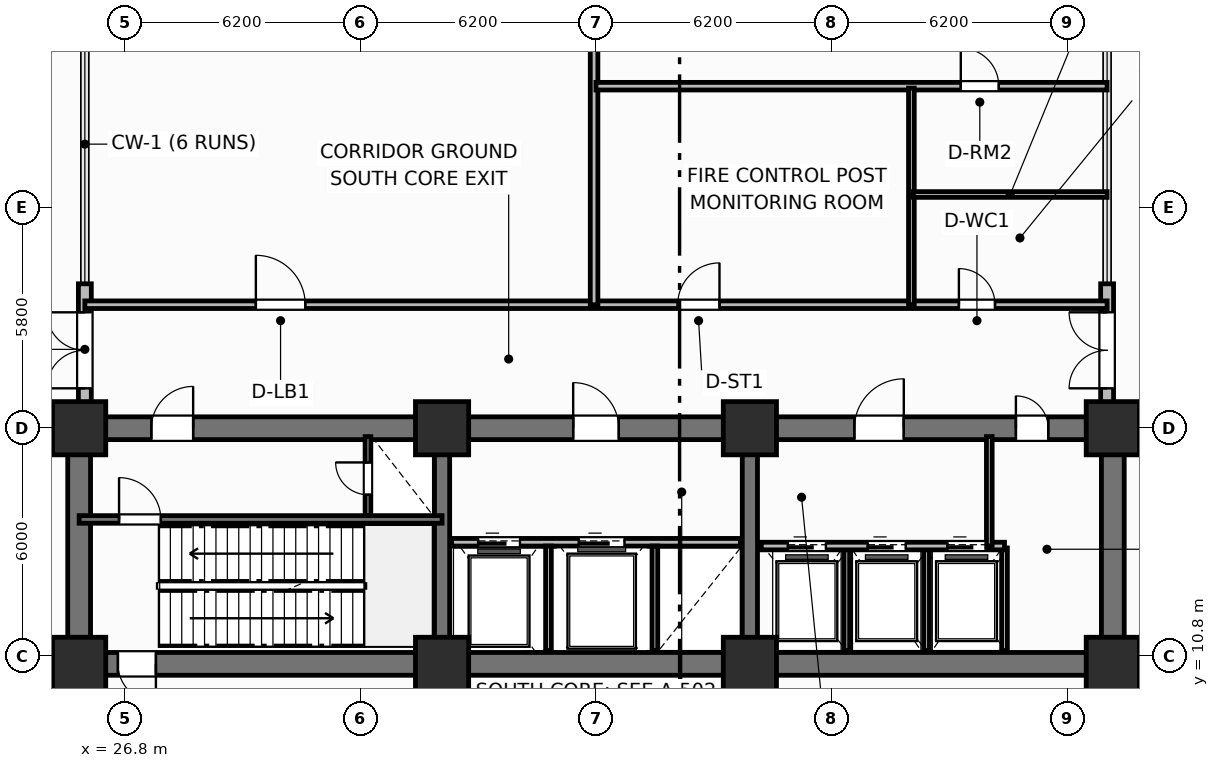
"""IFC4 building model, lengths in metres.
Left out: names, types, materials, properties, quantities, classifications, styles, units other than length and angle.
Written with IfcOpenShell. Run it as: python <this file> out.ifc"""

import sys

from ifc_helpers import new_model, si_unit, direction, frame, frame_2d, origin, origin_2d, place, context, subcontext, project, spatial, rectangle, extrude, element, fill, save


model = new_model("IFC4")
c1 = context("Model", 3, precision=1e-05, world=origin(), true_north=direction((0.0, 1.0)))
c2 = subcontext(c1, "Body", "Model", "MODEL_VIEW")
j1 = project(units=[si_unit("LENGTHUNIT", "METRE"), si_unit("PLANEANGLEUNIT", "RADIAN")], contexts=[c1])
p1 = place(None, origin())
s1 = spatial("IfcSite", under=j1, at=p1, CompositionType="ELEMENT")
p2 = place(p1, origin())
s2 = spatial("IfcBuilding", under=s1, at=p2, CompositionType="ELEMENT")
p3 = place(p2, origin())
s3 = spatial("IfcBuildingStorey", under=s2, at=p3, CompositionType="ELEMENT", Elevation=0.0)
p4 = place(p3, frame((52.8, 10.6, 0.0), z_axis=(0.0, 0.0, 1.0), x_axis=(-1.0, 0.0, 0.0)))
e1 = element("IfcWall", 1, at=p4, inside=s3, PredefinedType="SHEAR", context=c2, shape_type="SweptSolid", body=[
    extrude(rectangle(XDim=27.2, YDim=0.6, at=frame_2d((13.6, 0.0))), origin(), (0.0, 0.0, 1.0), 6.6),
])
p5 = place(p4, frame((25.18, 0.0, 0.0)))
e2 = element("IfcOpeningElement", 2, at=p5, cuts=e1, PredefinedType="OPENING", context=c2, shape_type="SweptSolid", body=[
    extrude(rectangle(XDim=1.0, YDim=2.15, at=frame_2d((0.5, 1.075))), frame((0.0, 0.31, 0.0), z_axis=(0.0, -1.0, 0.0), x_axis=(1.0, 0.0, 0.0)), (0.0, 0.0, 1.0), 0.62),
])
for number, where, z_axis, x_axis in (
    (3, (25.6, 10.9, 0.0), (0.0, 0.0, 1.0), (0.0, 1.0, 0.0)),
    (4, (52.8, 10.9, 0.0), (0.0, 0.0, 1.0), (0.0, 1.0, 0.0)),
):
    element("IfcWall", number, at=place(p3, frame(where, z_axis=z_axis, x_axis=x_axis)), inside=s3, PredefinedType="SHEAR", context=c2, shape_type="SweptSolid", body=[
        extrude(rectangle(XDim=5.6, YDim=0.6, at=frame_2d((2.8, 0.0))), origin(), (0.0, 0.0, 1.0), 6.6),
    ])
p6 = place(p3, frame((25.6, 16.8, 0.0), z_axis=(0.0, 0.0, 1.0), x_axis=(1.0, 0.0, 0.0)))
e5 = element("IfcWall", 5, at=p6, inside=s3, PredefinedType="SHEAR", context=c2, shape_type="SweptSolid", body=[
    extrude(rectangle(XDim=27.2, YDim=0.6, at=frame_2d((13.6, 0.0))), origin(), (0.0, 0.0, 1.0), 6.6),
])
p7 = place(p6, frame((1.9, 0.0, 0.0)))
e6 = element("IfcOpeningElement", 6, at=p7, cuts=e5, PredefinedType="OPENING", context=c2, shape_type="SweptSolid", body=[
    extrude(rectangle(XDim=1.1, YDim=2.15, at=frame_2d((0.55, 1.075))), frame((0.0, 0.31, 0.0), z_axis=(0.0, -1.0, 0.0), x_axis=(1.0, 0.0, 0.0)), (0.0, 0.0, 1.0), 0.62),
])
p8 = place(p6, frame((13.0, 0.0, 0.0)))
e7 = element("IfcOpeningElement", 7, at=p8, cuts=e5, PredefinedType="OPENING", context=c2, shape_type="SweptSolid", body=[
    extrude(rectangle(XDim=1.2, YDim=2.15, at=frame_2d((0.6, 1.075))), frame((0.0, 0.31, 0.0), z_axis=(0.0, -1.0, 0.0), x_axis=(1.0, 0.0, 0.0)), (0.0, 0.0, 1.0), 0.62),
])
p9 = place(p6, frame((20.4, 0.0, 0.0)))
e8 = element("IfcOpeningElement", 8, at=p9, cuts=e5, PredefinedType="OPENING", context=c2, shape_type="SweptSolid", body=[
    extrude(rectangle(XDim=1.3, YDim=2.2, at=frame_2d((0.65, 1.1))), frame((0.0, 0.31, 0.0), z_axis=(0.0, -1.0, 0.0), x_axis=(1.0, 0.0, 0.0)), (0.0, 0.0, 1.0), 0.62),
])
p10 = place(p6, frame((24.65, 0.0, 0.0)))
e9 = element("IfcOpeningElement", 9, at=p10, cuts=e5, PredefinedType="OPENING", context=c2, shape_type="SweptSolid", body=[
    extrude(rectangle(XDim=0.85, YDim=2.1, at=frame_2d((0.425, 1.05))), frame((0.0, 0.31, 0.0), z_axis=(0.0, -1.0, 0.0), x_axis=(1.0, 0.0, 0.0)), (0.0, 0.0, 1.0), 0.62),
])
for number, where, z_axis, x_axis in (
    (10, (35.15, 10.9, 0.0), (0.0, 0.0, 1.0), (0.0, 1.0, 0.0)),
    (11, (43.25, 10.9, 0.0), (0.0, 0.0, 1.0), (0.0, 1.0, 0.0)),
):
    element("IfcWall", number, at=place(p3, frame(where, z_axis=z_axis, x_axis=x_axis)), inside=s3, PredefinedType="SHEAR", context=c2, shape_type="SweptSolid", body=[
        extrude(rectangle(XDim=5.6, YDim=0.4, at=frame_2d((2.8, 0.0))), origin(), (0.0, 0.0, 1.0), 6.6),
    ])
for number, where, z_axis, x_axis in (
    (12, (25.6, 10.6, 0.0), (0.0, 0.0, 1.0), (1.0, 0.0, 0.0)),
    (13, (25.6, 16.8, 0.0), (0.0, 0.0, 1.0), (1.0, 0.0, 0.0)),
    (14, (35.15, 10.6, 0.0), (0.0, 0.0, 1.0), (1.0, 0.0, 0.0)),
    (15, (35.15, 16.8, 0.0), (0.0, 0.0, 1.0), (1.0, 0.0, 0.0)),
    (16, (43.25, 10.6, 0.0), (0.0, 0.0, 1.0), (1.0, 0.0, 0.0)),
    (17, (43.25, 16.8, 0.0), (0.0, 0.0, 1.0), (1.0, 0.0, 0.0)),
    (18, (52.8, 10.6, 0.0), (0.0, 0.0, 1.0), (1.0, 0.0, 0.0)),
    (19, (52.8, 16.8, 0.0), (0.0, 0.0, 1.0), (1.0, 0.0, 0.0)),
):
    element("IfcColumn", number, at=place(p3, frame(where, z_axis=z_axis, x_axis=x_axis)), inside=s3, PredefinedType="COLUMN", context=c2, shape_type="SweptSolid", body=[
        extrude(rectangle(XDim=1.4, YDim=1.4, at=origin_2d()), origin(), (0.0, 0.0, 1.0), 6.6),
    ])
p11 = place(p3, frame((25.75, 17.15, 0.0), z_axis=(0.0, 0.0, 1.0), x_axis=(0.0, 1.0, 0.0)))
e20 = element("IfcWall", 20, at=p11, inside=s3, PredefinedType="SOLIDWALL", context=c2, shape_type="SweptSolid", body=[
    extrude(rectangle(XDim=3.45, YDim=0.34, at=frame_2d((1.725, 0.0))), origin(), (0.0, 0.0, 1.0), 5.58),
])
p12 = place(p11, frame((0.7, 0.0, 0.0)))
e21 = element("IfcOpeningElement", 21, at=p12, cuts=e20, PredefinedType="OPENING", context=c2, shape_type="SweptSolid", body=[
    extrude(rectangle(XDim=2.0, YDim=2.45, at=frame_2d((1.0, 1.225))), frame((0.0, 0.18, 0.0), z_axis=(0.0, -1.0, 0.0), x_axis=(1.0, 0.0, 0.0)), (0.0, 0.0, 1.0), 0.36),
])
p13 = place(p3, frame((52.65, 17.15, 0.0), z_axis=(0.0, 0.0, 1.0), x_axis=(0.0, 1.0, 0.0)))
e22 = element("IfcWall", 22, at=p13, inside=s3, PredefinedType="SOLIDWALL", context=c2, shape_type="SweptSolid", body=[
    extrude(rectangle(XDim=3.45, YDim=0.34, at=frame_2d((1.725, 0.0))), origin(), (0.0, 0.0, 1.0), 5.58),
])
p14 = place(p13, frame((0.7, 0.0, 0.0)))
e23 = element("IfcOpeningElement", 23, at=p14, cuts=e22, PredefinedType="OPENING", context=c2, shape_type="SweptSolid", body=[
    extrude(rectangle(XDim=2.0, YDim=2.45, at=frame_2d((1.0, 1.225))), frame((0.0, 0.18, 0.0), z_axis=(0.0, -1.0, 0.0), x_axis=(1.0, 0.0, 0.0)), (0.0, 0.0, 1.0), 0.36),
])
p15 = place(p3, frame((25.6, 14.4, 0.0), z_axis=(0.0, 0.0, 1.0), x_axis=(1.0, 0.0, 0.0)))
e24 = element("IfcWall", 24, at=p15, inside=s3, PredefinedType="SHEAR", context=c2, shape_type="SweptSolid", body=[
    extrude(rectangle(XDim=9.55, YDim=0.2, at=frame_2d((4.775, 0.0))), origin(), (0.0, 0.0, 1.0), 6.6),
])
p16 = place(p15, frame((1.05, 0.0, 0.0)))
e25 = element("IfcOpeningElement", 25, at=p16, cuts=e24, PredefinedType="OPENING", context=c2, shape_type="SweptSolid", body=[
    extrude(rectangle(XDim=1.1, YDim=2.15, at=frame_2d((0.55, 1.075))), frame((0.0, 0.11, 0.0), z_axis=(0.0, -1.0, 0.0), x_axis=(1.0, 0.0, 0.0)), (0.0, 0.0, 1.0), 0.22),
])
p17 = place(p3, frame((33.2, 14.5, 0.0), z_axis=(0.0, 0.0, 1.0), x_axis=(0.0, 1.0, 0.0)))
e26 = element("IfcWall", 26, at=p17, inside=s3, PredefinedType="PARTITIONING", context=c2, shape_type="SweptSolid", body=[
    extrude(rectangle(XDim=2.08, YDim=0.15, at=frame_2d((1.04, 0.0))), origin(), (0.0, 0.0, 1.0), 5.52),
])
p18 = place(p17, frame((0.55, 0.0, 0.0)))
e27 = element("IfcOpeningElement", 27, at=p18, cuts=e26, PredefinedType="OPENING", context=c2, shape_type="SweptSolid", body=[
    extrude(rectangle(XDim=0.85, YDim=2.05, at=frame_2d((0.425, 1.025))), frame((0.0, 0.085, 0.0), z_axis=(0.0, -1.0, 0.0), x_axis=(1.0, 0.0, 0.0)), (0.0, 0.0, 1.0), 0.17),
])
p19 = place(p3, frame((35.4, 13.8, 0.0), z_axis=(0.0, 0.0, 1.0), x_axis=(1.0, 0.0, 0.0)))
e28 = element("IfcWall", 28, at=p19, inside=s3, PredefinedType="PARTITIONING", context=c2, shape_type="SweptSolid", body=[
    extrude(rectangle(XDim=7.6, YDim=0.2, at=frame_2d((3.8, 0.0))), origin(), (0.0, 0.0, 1.0), 5.18),
])
p20 = place(p19, frame((0.7, 0.0, 0.0)))
e29 = element("IfcOpeningElement", 29, at=p20, cuts=e28, PredefinedType="OPENING", context=c2, shape_type="SweptSolid", body=[
    extrude(rectangle(XDim=1.1, YDim=2.15, at=frame_2d((0.55, 1.075))), frame((0.0, 0.11, 0.0), z_axis=(0.0, -1.0, 0.0), x_axis=(1.0, 0.0, 0.0)), (0.0, 0.0, 1.0), 0.22),
])
p21 = place(p19, frame((3.35, 0.0, 0.0)))
e30 = element("IfcOpeningElement", 30, at=p21, cuts=e28, PredefinedType="OPENING", context=c2, shape_type="SweptSolid", body=[
    extrude(rectangle(XDim=1.2, YDim=2.15, at=frame_2d((0.6, 1.075))), frame((0.0, 0.11, 0.0), z_axis=(0.0, -1.0, 0.0), x_axis=(1.0, 0.0, 0.0)), (0.0, 0.0, 1.0), 0.22),
])
for number, where, z_axis, x_axis in (
    (31, (37.95, 10.95, 0.0), (0.0, 0.0, 1.0), (0.0, 1.0, 0.0)),
    (32, (40.75, 10.95, 0.0), (0.0, 0.0, 1.0), (0.0, 1.0, 0.0)),
):
    element("IfcWall", number, at=place(p3, frame(where, z_axis=z_axis, x_axis=x_axis)), inside=s3, PredefinedType="PARTITIONING", context=c2, shape_type="SweptSolid", body=[
        extrude(rectangle(XDim=2.75, YDim=0.15, at=frame_2d((1.375, 0.0))), origin(), (0.0, 0.0, 1.0), 5.52),
    ])
for number, where, z_axis, x_axis in (
    (33, (45.8, 10.95, 0.0), (0.0, 0.0, 1.0), (0.0, 1.0, 0.0)),
    (34, (47.9, 10.95, 0.0), (0.0, 0.0, 1.0), (0.0, 1.0, 0.0)),
    (35, (49.95, 10.95, 0.0), (0.0, 0.0, 1.0), (0.0, 1.0, 0.0)),
):
    element("IfcWall", number, at=place(p3, frame(where, z_axis=z_axis, x_axis=x_axis)), inside=s3, PredefinedType="PARTITIONING", context=c2, shape_type="SweptSolid", body=[
        extrude(rectangle(XDim=2.7, YDim=0.15, at=frame_2d((1.35, 0.0))), origin(), (0.0, 0.0, 1.0), 5.52),
    ])
p22 = place(p3, frame((43.55, 13.7, 0.0), z_axis=(0.0, 0.0, 1.0), x_axis=(1.0, 0.0, 0.0)))
e36 = element("IfcWall", 36, at=p22, inside=s3, PredefinedType="PARTITIONING", context=c2, shape_type="SweptSolid", body=[
    extrude(rectangle(XDim=6.4, YDim=0.2, at=frame_2d((3.2, 0.0))), origin(), (0.0, 0.0, 1.0), 5.52),
])
p23 = place(p22, frame((0.7, 0.0, 0.0)))
e37 = element("IfcOpeningElement", 37, at=p23, cuts=e36, PredefinedType="OPENING", context=c2, shape_type="SweptSolid", body=[
    extrude(rectangle(XDim=1.0, YDim=2.15, at=frame_2d((0.5, 1.075))), frame((0.0, 0.11, 0.0), z_axis=(0.0, -1.0, 0.0), x_axis=(1.0, 0.0, 0.0)), (0.0, 0.0, 1.0), 0.22),
])
p24 = place(p22, frame((2.8, 0.0, 0.0)))
e38 = element("IfcOpeningElement", 38, at=p24, cuts=e36, PredefinedType="OPENING", context=c2, shape_type="SweptSolid", body=[
    extrude(rectangle(XDim=1.0, YDim=2.15, at=frame_2d((0.5, 1.075))), frame((0.0, 0.11, 0.0), z_axis=(0.0, -1.0, 0.0), x_axis=(1.0, 0.0, 0.0)), (0.0, 0.0, 1.0), 0.22),
])
p25 = place(p22, frame((4.9, 0.0, 0.0)))
e39 = element("IfcOpeningElement", 39, at=p25, cuts=e36, PredefinedType="OPENING", context=c2, shape_type="SweptSolid", body=[
    extrude(rectangle(XDim=1.0, YDim=2.15, at=frame_2d((0.5, 1.075))), frame((0.0, 0.11, 0.0), z_axis=(0.0, -1.0, 0.0), x_axis=(1.0, 0.0, 0.0)), (0.0, 0.0, 1.0), 0.22),
])
p26 = place(p3, frame((49.55, 13.7, 0.0), z_axis=(0.0, 0.0, 1.0), x_axis=(0.0, 1.0, 0.0)))
e40 = element("IfcWall", 40, at=p26, inside=s3, PredefinedType="PARTITIONING", context=c2, shape_type="SweptSolid", body=[
    extrude(rectangle(XDim=2.88, YDim=0.15, at=frame_2d((1.44, 0.0))), origin(), (0.0, 0.0, 1.0), 5.52),
])
p27 = place(p3, frame((25.75, 20.05, 0.0), z_axis=(0.0, 0.0, 1.0), x_axis=(1.0, 0.0, 0.0)))
e41 = element("IfcWall", 41, at=p27, inside=s3, PredefinedType="PARTITIONING", context=c2, shape_type="SweptSolid", body=[
    extrude(rectangle(XDim=26.9, YDim=0.2, at=frame_2d((13.45, 0.0))), origin(), (0.0, 0.0, 1.0), 5.52),
])
p28 = place(p27, frame((4.5, 0.0, 0.0)))
e42 = element("IfcOpeningElement", 42, at=p28, cuts=e41, PredefinedType="OPENING", context=c2, shape_type="SweptSolid", body=[
    extrude(rectangle(XDim=1.3, YDim=2.2, at=frame_2d((0.65, 1.1))), frame((0.0, 0.11, 0.0), z_axis=(0.0, -1.0, 0.0), x_axis=(1.0, 0.0, 0.0)), (0.0, 0.0, 1.0), 0.22),
])
p29 = place(p27, frame((15.6, 0.0, 0.0)))
e43 = element("IfcOpeningElement", 43, at=p29, cuts=e41, PredefinedType="OPENING", context=c2, shape_type="SweptSolid", body=[
    extrude(rectangle(XDim=1.1, YDim=2.15, at=frame_2d((0.55, 1.075))), frame((0.0, 0.11, 0.0), z_axis=(0.0, -1.0, 0.0), x_axis=(1.0, 0.0, 0.0)), (0.0, 0.0, 1.0), 0.22),
])
p30 = place(p27, frame((23.0, 0.0, 0.0)))
e44 = element("IfcOpeningElement", 44, at=p30, cuts=e41, PredefinedType="OPENING", context=c2, shape_type="SweptSolid", body=[
    extrude(rectangle(XDim=0.95, YDim=2.1, at=frame_2d((0.475, 1.05))), frame((0.0, 0.11, 0.0), z_axis=(0.0, -1.0, 0.0), x_axis=(1.0, 0.0, 0.0)), (0.0, 0.0, 1.0), 0.22),
])
p31 = place(p3, frame((39.15, 20.05, 0.0), z_axis=(0.0, 0.0, 1.0), x_axis=(0.0, 1.0, 0.0)))
e45 = element("IfcWall", 45, at=p31, inside=s3, PredefinedType="PARTITIONING", context=c2, shape_type="SweptSolid", body=[
    extrude(rectangle(XDim=16.3, YDim=0.2, at=frame_2d((8.15, 0.0))), origin(), (0.0, 0.0, 1.0), 5.52),
])
p32 = place(p3, frame((39.2, 25.8, 0.0), z_axis=(0.0, 0.0, 1.0), x_axis=(1.0, 0.0, 0.0)))
e46 = element("IfcWall", 46, at=p32, inside=s3, PredefinedType="PARTITIONING", context=c2, shape_type="SweptSolid", body=[
    extrude(rectangle(XDim=13.45, YDim=0.2, at=frame_2d((6.725, 0.0))), origin(), (0.0, 0.0, 1.0), 5.52),
])
p33 = place(p32, frame((9.6, 0.0, 0.0)))
e47 = element("IfcOpeningElement", 47, at=p33, cuts=e46, PredefinedType="OPENING", context=c2, shape_type="SweptSolid", body=[
    extrude(rectangle(XDim=1.0, YDim=2.15, at=frame_2d((0.5, 1.075))), frame((0.0, 0.11, 0.0), z_axis=(0.0, -1.0, 0.0), x_axis=(1.0, 0.0, 0.0)), (0.0, 0.0, 1.0), 0.22),
])
p34 = place(p3, frame((47.5, 20.05, 0.0), z_axis=(0.0, 0.0, 1.0), x_axis=(0.0, 1.0, 0.0)))
e48 = element("IfcWall", 48, at=p34, inside=s3, PredefinedType="PARTITIONING", context=c2, shape_type="SweptSolid", body=[
    extrude(rectangle(XDim=5.7, YDim=0.15, at=frame_2d((2.85, 0.0))), origin(), (0.0, 0.0, 1.0), 5.52),
])
p35 = place(p3, frame((47.55, 22.95, 0.0), z_axis=(0.0, 0.0, 1.0), x_axis=(1.0, 0.0, 0.0)))
e49 = element("IfcWall", 49, at=p35, inside=s3, PredefinedType="PARTITIONING", context=c2, shape_type="SweptSolid", body=[
    extrude(rectangle(XDim=5.1, YDim=0.15, at=frame_2d((2.55, 0.0))), origin(), (0.0, 0.0, 1.0), 5.52),
])
p36 = place(p12, origin())
e50 = element("IfcDoor", 50, at=p36, inside=s3, OperationType="DOUBLE_DOOR_SINGLE_SWING", PredefinedType="DOOR", context=c2, shape_type="SweptSolid", body=[
    extrude(rectangle(XDim=2.0, YDim=2.45, at=frame_2d((1.0, 1.225))), frame((0.0, 0.025, 0.0), z_axis=(0.0, -1.0, 0.0), x_axis=(1.0, 0.0, 0.0)), (0.0, 0.0, 1.0), 0.05),
])
fill(e21, e50)
p37 = place(p14, origin())
e51 = element("IfcDoor", 51, at=p37, inside=s3, OperationType="DOUBLE_DOOR_SINGLE_SWING", PredefinedType="DOOR", context=c2, shape_type="SweptSolid", body=[
    extrude(rectangle(XDim=2.0, YDim=2.45, at=frame_2d((1.0, 1.225))), frame((0.0, 0.025, 0.0), z_axis=(0.0, -1.0, 0.0), x_axis=(1.0, 0.0, 0.0)), (0.0, 0.0, 1.0), 0.05),
])
fill(e23, e51)
p38 = place(p16, origin())
e52 = element("IfcDoor", 52, at=p38, inside=s3, OperationType="SINGLE_SWING_LEFT", PredefinedType="DOOR", context=c2, shape_type="SweptSolid", body=[
    extrude(rectangle(XDim=1.1, YDim=2.15, at=frame_2d((0.55, 1.075))), frame((0.0, 0.025, 0.0), z_axis=(0.0, -1.0, 0.0), x_axis=(1.0, 0.0, 0.0)), (0.0, 0.0, 1.0), 0.05),
])
fill(e25, e52)
p39 = place(p18, origin())
e53 = element("IfcDoor", 53, at=p39, inside=s3, OperationType="SINGLE_SWING_RIGHT", PredefinedType="TRAPDOOR", context=c2, shape_type="SweptSolid", body=[
    extrude(rectangle(XDim=0.85, YDim=2.05, at=frame_2d((0.425, 1.025))), frame((0.0, 0.025, 0.0), z_axis=(0.0, -1.0, 0.0), x_axis=(1.0, 0.0, 0.0)), (0.0, 0.0, 1.0), 0.05),
])
fill(e27, e53)
p40 = place(p20, origin())
e54 = element("IfcDoor", 54, at=p40, inside=s3, OperationType="SLIDING_TO_LEFT", PredefinedType="DOOR", context=c2, shape_type="SweptSolid", body=[
    extrude(rectangle(XDim=1.1, YDim=2.15, at=frame_2d((0.55, 1.075))), frame((0.0, 0.025, 0.0), z_axis=(0.0, -1.0, 0.0), x_axis=(1.0, 0.0, 0.0)), (0.0, 0.0, 1.0), 0.05),
])
fill(e29, e54)
p41 = place(p21, origin())
e55 = element("IfcDoor", 55, at=p41, inside=s3, OperationType="SLIDING_TO_LEFT", PredefinedType="DOOR", context=c2, shape_type="SweptSolid", body=[
    extrude(rectangle(XDim=1.2, YDim=2.15, at=frame_2d((0.6, 1.075))), frame((0.0, 0.025, 0.0), z_axis=(0.0, -1.0, 0.0), x_axis=(1.0, 0.0, 0.0)), (0.0, 0.0, 1.0), 0.05),
])
fill(e30, e55)
p42 = place(p23, origin())
e56 = element("IfcDoor", 56, at=p42, inside=s3, OperationType="SLIDING_TO_LEFT", PredefinedType="DOOR", context=c2, shape_type="SweptSolid", body=[
    extrude(rectangle(XDim=1.0, YDim=2.15, at=frame_2d((0.5, 1.075))), frame((0.0, 0.025, 0.0), z_axis=(0.0, -1.0, 0.0), x_axis=(1.0, 0.0, 0.0)), (0.0, 0.0, 1.0), 0.05),
])
fill(e37, e56)
p43 = place(p24, origin())
e57 = element("IfcDoor", 57, at=p43, inside=s3, OperationType="SLIDING_TO_LEFT", PredefinedType="DOOR", context=c2, shape_type="SweptSolid", body=[
    extrude(rectangle(XDim=1.0, YDim=2.15, at=frame_2d((0.5, 1.075))), frame((0.0, 0.025, 0.0), z_axis=(0.0, -1.0, 0.0), x_axis=(1.0, 0.0, 0.0)), (0.0, 0.0, 1.0), 0.05),
])
fill(e38, e57)
p44 = place(p25, origin())
e58 = element("IfcDoor", 58, at=p44, inside=s3, OperationType="SLIDING_TO_LEFT", PredefinedType="DOOR", context=c2, shape_type="SweptSolid", body=[
    extrude(rectangle(XDim=1.0, YDim=2.15, at=frame_2d((0.5, 1.075))), frame((0.0, 0.025, 0.0), z_axis=(0.0, -1.0, 0.0), x_axis=(1.0, 0.0, 0.0)), (0.0, 0.0, 1.0), 0.05),
])
fill(e39, e58)
p45 = place(p28, origin())
e59 = element("IfcDoor", 59, at=p45, inside=s3, OperationType="SINGLE_SWING_LEFT", PredefinedType="DOOR", context=c2, shape_type="SweptSolid", body=[
    extrude(rectangle(XDim=1.3, YDim=2.2, at=frame_2d((0.65, 1.1))), frame((0.0, 0.025, 0.0), z_axis=(0.0, -1.0, 0.0), x_axis=(1.0, 0.0, 0.0)), (0.0, 0.0, 1.0), 0.05),
])
fill(e42, e59)
p46 = place(p29, origin())
e60 = element("IfcDoor", 60, at=p46, inside=s3, OperationType="SINGLE_SWING_RIGHT", PredefinedType="DOOR", context=c2, shape_type="SweptSolid", body=[
    extrude(rectangle(XDim=1.1, YDim=2.15, at=frame_2d((0.55, 1.075))), frame((0.0, 0.025, 0.0), z_axis=(0.0, -1.0, 0.0), x_axis=(1.0, 0.0, 0.0)), (0.0, 0.0, 1.0), 0.05),
])
fill(e43, e60)
p47 = place(p30, origin())
e61 = element("IfcDoor", 61, at=p47, inside=s3, OperationType="SINGLE_SWING_LEFT", PredefinedType="DOOR", context=c2, shape_type="SweptSolid", body=[
    extrude(rectangle(XDim=0.95, YDim=2.1, at=frame_2d((0.475, 1.05))), frame((0.0, 0.025, 0.0), z_axis=(0.0, -1.0, 0.0), x_axis=(1.0, 0.0, 0.0)), (0.0, 0.0, 1.0), 0.05),
])
fill(e44, e61)
p48 = place(p33, origin())
e62 = element("IfcDoor", 62, at=p48, inside=s3, OperationType="SINGLE_SWING_LEFT", PredefinedType="DOOR", context=c2, shape_type="SweptSolid", body=[
    extrude(rectangle(XDim=1.0, YDim=2.15, at=frame_2d((0.5, 1.075))), frame((0.0, 0.025, 0.0), z_axis=(0.0, -1.0, 0.0), x_axis=(1.0, 0.0, 0.0)), (0.0, 0.0, 1.0), 0.05),
])
fill(e47, e62)
p49 = place(p5, origin())
e63 = element("IfcDoor", 63, at=p49, inside=s3, OperationType="SINGLE_SWING_LEFT", PredefinedType="DOOR", context=c2, shape_type="SweptSolid", body=[
    extrude(rectangle(XDim=1.0, YDim=2.15, at=frame_2d((0.5, 1.075))), frame((0.0, 0.025, 0.0), z_axis=(0.0, -1.0, 0.0), x_axis=(1.0, 0.0, 0.0)), (0.0, 0.0, 1.0), 0.05),
])
fill(e2, e63)
p50 = place(p7, origin())
e64 = element("IfcDoor", 64, at=p50, inside=s3, OperationType="SINGLE_SWING_RIGHT", PredefinedType="DOOR", context=c2, shape_type="SweptSolid", body=[
    extrude(rectangle(XDim=1.1, YDim=2.15, at=frame_2d((0.55, 1.075))), frame((0.0, 0.025, 0.0), z_axis=(0.0, -1.0, 0.0), x_axis=(1.0, 0.0, 0.0)), (0.0, 0.0, 1.0), 0.05),
])
fill(e6, e64)
p51 = place(p8, origin())
e65 = element("IfcDoor", 65, at=p51, inside=s3, OperationType="SINGLE_SWING_LEFT", PredefinedType="DOOR", context=c2, shape_type="SweptSolid", body=[
    extrude(rectangle(XDim=1.2, YDim=2.15, at=frame_2d((0.6, 1.075))), frame((0.0, 0.025, 0.0), z_axis=(0.0, -1.0, 0.0), x_axis=(1.0, 0.0, 0.0)), (0.0, 0.0, 1.0), 0.05),
])
fill(e7, e65)
p52 = place(p9, origin())
e66 = element("IfcDoor", 66, at=p52, inside=s3, OperationType="SINGLE_SWING_RIGHT", PredefinedType="DOOR", context=c2, shape_type="SweptSolid", body=[
    extrude(rectangle(XDim=1.3, YDim=2.2, at=frame_2d((0.65, 1.1))), frame((0.0, 0.025, 0.0), z_axis=(0.0, -1.0, 0.0), x_axis=(1.0, 0.0, 0.0)), (0.0, 0.0, 1.0), 0.05),
])
fill(e8, e66)
p53 = place(p10, origin())
e67 = element("IfcDoor", 67, at=p53, inside=s3, OperationType="SINGLE_SWING_LEFT", PredefinedType="DOOR", context=c2, shape_type="SweptSolid", body=[
    extrude(rectangle(XDim=0.85, YDim=2.1, at=frame_2d((0.425, 1.05))), frame((0.0, 0.025, 0.0), z_axis=(0.0, -1.0, 0.0), x_axis=(1.0, 0.0, 0.0)), (0.0, 0.0, 1.0), 0.05),
])
fill(e9, e67)
save(model, sys.argv[1])
